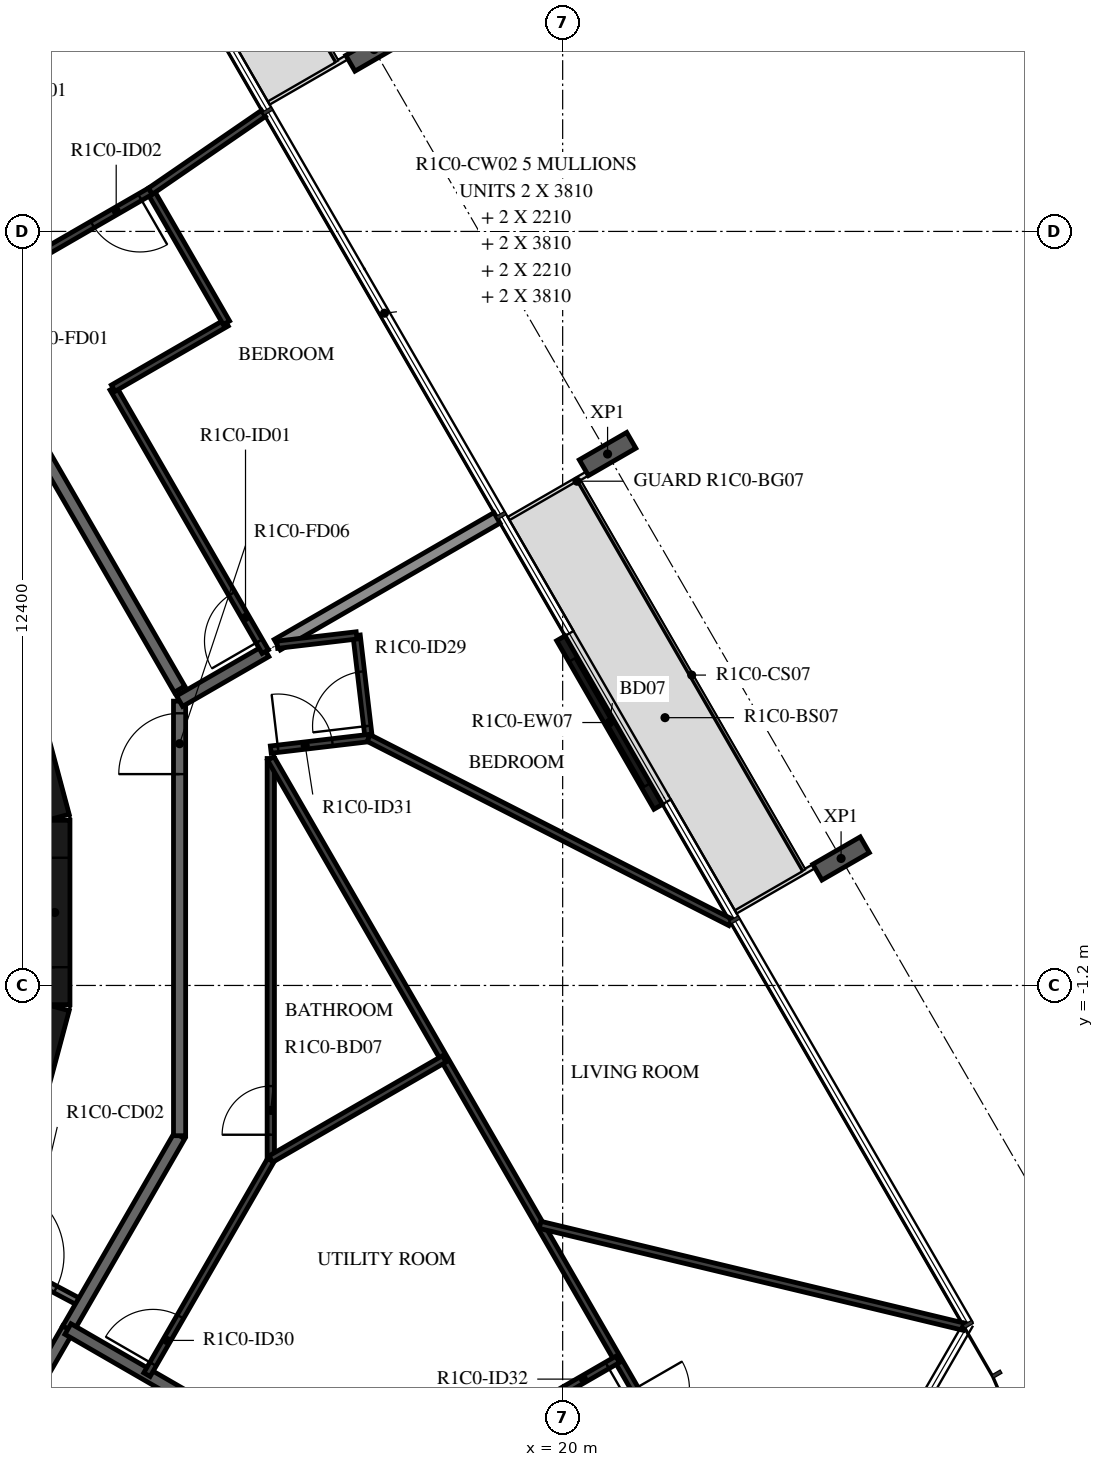
"""IFC4 building model, lengths in metres.
Left out: names, types, materials, properties, quantities, classifications, styles, units other than length and angle.
Written with IfcOpenShell. Run it as: python <this file> out.ifc"""

import sys

from ifc_helpers import new_model, si_unit, direction, frame, frame_2d, origin, origin_2d, place, context, subcontext, project, spatial, rectangle, i_section, extrude, element, fill, save


model = new_model("IFC4")
c1 = context("Model", 3, precision=1e-05, world=origin(), true_north=direction((0.0, 1.0)))
c2 = subcontext(c1, "Body", "Model", "MODEL_VIEW")
j1 = project(units=[si_unit("LENGTHUNIT", "METRE"), si_unit("PLANEANGLEUNIT", "RADIAN")], contexts=[c1])
p1 = place(None, origin())
s1 = spatial("IfcSite", under=j1, at=p1, CompositionType="ELEMENT")
p2 = place(p1, origin())
s2 = spatial("IfcBuilding", under=s1, at=p2, CompositionType="ELEMENT")
p3 = place(p2, frame((0.0, 0.0, 59.4)))
s3 = spatial("IfcBuildingStorey", under=s2, at=p3, CompositionType="ELEMENT", Elevation=59.4)
for number, where, z_axis, x_axis in (
    (1, (24.579, 0.888, -0.38), (0.0, 0.0, 1.0), (0.5, -0.866, 0.0)),
    (2, (20.739, 7.539, -0.38), (0.0, 0.0, 1.0), (0.5, -0.866, 0.0)),
    (3, (16.899, 14.19, -0.38), (0.0, 0.0, 1.0), (0.5, -0.866, 0.0)),
):
    element("IfcColumn", number, at=place(p3, frame(where, z_axis=z_axis, x_axis=x_axis)), inside=s3, PredefinedType="COLUMN", context=c2, shape_type="SweptSolid", body=[
        extrude(i_section(OverallWidth=0.3, OverallDepth=0.9, WebThickness=0.019, FlangeThickness=0.035, FilletRadius=0.03, at=origin_2d()), origin(), (0.0, 0.0, 1.0), 3.5),
    ])
p4 = place(p3, frame((21.571, 1.738, 0.0), z_axis=(0.0, 0.0, 1.0), x_axis=(-0.500028443584, 0.866008981251, 0.0)))
e4 = element("IfcWall", 4, at=p4, inside=s3, PredefinedType="STANDARD", context=c2, shape_type="SweptSolid", body=[
    extrude(rectangle(XDim=3.2, YDim=0.16, at=frame_2d((1.6, 0.0))), origin(), (0.0, 0.0, 1.0), 3.12),
])
p5 = place(p4, frame((0.4, 0.0, 0.0)))
e5 = element("IfcOpeningElement", 5, at=p5, cuts=e4, PredefinedType="OPENING", context=c2, shape_type="SweptSolid", body=[
    extrude(rectangle(XDim=2.4, YDim=2.4, at=frame_2d((1.2, 1.2))), frame((0.0, 0.09, 0.0), z_axis=(0.0, -1.0, 0.0), x_axis=(1.0, 0.0, 0.0)), (0.0, 0.0, 1.0), 0.18),
])
p6 = place(p3, frame((10.858, -4.479, 0.0), z_axis=(0.0, 0.0, 1.0), x_axis=(0.258734743916, 0.965948410781, 0.0)))
e6 = element("IfcWall", 6, at=p6, inside=s3, PredefinedType="SHEAR", context=c2, shape_type="SweptSolid", body=[
    extrude(rectangle(XDim=3.033, YDim=0.5, at=frame_2d((1.516, 0.0))), origin(), (0.0, 0.0, 1.0), 3.12),
])
p7 = place(p3, frame((11.647, -1.516, 0.0), z_axis=(0.0, 0.0, 1.0), x_axis=(0.0, 1.0, 0.0)))
e7 = element("IfcWall", 7, at=p7, inside=s3, PredefinedType="SHEAR", context=c2, shape_type="SweptSolid", body=[
    extrude(rectangle(XDim=3.033, YDim=0.5, at=frame_2d((1.516, 0.0))), origin(), (0.0, 0.0, 1.0), 3.12),
])
p8 = place(p7, frame((0.616, 0.0, 0.0)))
e8 = element("IfcOpeningElement", 8, at=p8, cuts=e7, PredefinedType="OPENING", context=c2, shape_type="SweptSolid", body=[
    extrude(rectangle(XDim=1.8, YDim=2.1, at=frame_2d((0.9, 1.05))), frame((0.0, 0.26, 0.0), z_axis=(0.0, -1.0, 0.0), x_axis=(1.0, 0.0, 0.0)), (0.0, 0.0, 1.0), 0.52),
])
p9 = place(p3, frame((11.643, 1.55, 0.0), z_axis=(0.0, 0.0, 1.0), x_axis=(-0.258734743916, 0.965948410781, 0.0)))
e9 = element("IfcWall", 9, at=p9, inside=s3, PredefinedType="SHEAR", context=c2, shape_type="SweptSolid", body=[
    extrude(rectangle(XDim=3.033, YDim=0.5, at=frame_2d((1.516, 0.0))), origin(), (0.0, 0.0, 1.0), 3.12),
])
p10 = place(p3, frame((10.511, -5.589, 0.0), z_axis=(0.0, 0.0, 1.0), x_axis=(0.88294043061, -0.469485032769, 0.0)))
e10 = element("IfcWall", 10, at=p10, inside=s3, PredefinedType="PARTITIONING", context=c2, shape_type="SweptSolid", body=[
    extrude(rectangle(XDim=1.804, YDim=0.12, at=frame_2d((0.902, 0.0))), origin(), (0.0, 0.0, 1.0), 3.12),
])
p11 = place(p10, frame((0.1, 0.0, 0.0)))
e11 = element("IfcOpeningElement", 11, at=p11, cuts=e10, PredefinedType="OPENING", context=c2, shape_type="SweptSolid", body=[
    extrude(rectangle(XDim=1.2, YDim=2.1, at=frame_2d((0.6, 1.05))), frame((0.0, 0.07, 0.0), z_axis=(0.0, -1.0, 0.0), x_axis=(1.0, 0.0, 0.0)), (0.0, 0.0, 1.0), 0.14),
])
p12 = place(p3, frame((13.7, 3.671, 0.0), z_axis=(0.0, 0.0, 1.0), x_axis=(-0.500001669485, 0.866024439905, 0.0)))
e12 = element("IfcWall", 12, at=p12, inside=s3, PredefinedType="STANDARD", context=c2, shape_type="SweptSolid", body=[
    extrude(rectangle(XDim=7.342, YDim=0.2, at=frame_2d((3.671, 0.0))), origin(), (0.0, 0.0, 1.0), 3.12),
])
p13 = place(p12, frame((6.142, 0.0, 0.0)))
e13 = element("IfcOpeningElement", 13, at=p13, cuts=e12, PredefinedType="OPENING", context=c2, shape_type="SweptSolid", body=[
    extrude(rectangle(XDim=1.0, YDim=2.1, at=frame_2d((0.5, 1.05))), frame((0.0, 0.11, 0.0), z_axis=(0.0, -1.0, 0.0), x_axis=(1.0, 0.0, 0.0)), (0.0, 0.0, 1.0), 0.22),
])
p14 = place(p3, frame((11.865, -6.85, 0.0), z_axis=(0.0, 0.0, 1.0), x_axis=(0.499987270552, 0.86603275301, 0.0)))
e14 = element("IfcWall", 14, at=p14, inside=s3, PredefinedType="STANDARD", context=c2, shape_type="SweptSolid", body=[
    extrude(rectangle(XDim=3.671, YDim=0.2, at=frame_2d((1.835, 0.0))), origin(), (0.0, 0.0, 1.0), 3.12),
])
p15 = place(p3, frame((13.7, -3.671, 0.0), z_axis=(0.0, 0.0, 1.0), x_axis=(0.0, 1.0, 0.0)))
e15 = element("IfcWall", 15, at=p15, inside=s3, PredefinedType="STANDARD", context=c2, shape_type="SweptSolid", body=[
    extrude(rectangle(XDim=7.146, YDim=0.2, at=frame_2d((3.573, 0.0))), origin(), (0.0, 0.0, 1.0), 3.12),
])
p16 = place(p15, frame((5.947, 0.0, 0.0)))
e16 = element("IfcOpeningElement", 16, at=p16, cuts=e15, PredefinedType="OPENING", context=c2, shape_type="SweptSolid", body=[
    extrude(rectangle(XDim=1.0, YDim=2.1, at=frame_2d((0.5, 1.05))), frame((0.0, 0.11, 0.0), z_axis=(0.0, -1.0, 0.0), x_axis=(1.0, 0.0, 0.0)), (0.0, 0.0, 1.0), 0.22),
])
p17 = place(p3, frame((10.029, -10.029, 0.0), z_axis=(0.0, 0.0, 1.0), x_axis=(0.50001606911, 0.866016126081, 0.0)))
e17 = element("IfcWall", 17, at=p17, inside=s3, PredefinedType="STANDARD", context=c2, shape_type="SweptSolid", body=[
    extrude(rectangle(XDim=3.671, YDim=0.2, at=frame_2d((1.835, 0.0))), origin(), (0.0, 0.0, 1.0), 3.12),
])
p18 = place(p3, frame((13.7, 3.476, 0.0), z_axis=(0.0, 0.0, 1.0), x_axis=(0.866014281772, 0.500019263395, 0.0)))
e18 = element("IfcWall", 18, at=p18, inside=s3, PredefinedType="STANDARD", context=c2, shape_type="SweptSolid", body=[
    extrude(rectangle(XDim=1.638, YDim=0.2, at=frame_2d((0.819, 0.0))), origin(), (0.0, 0.0, 1.0), 3.12),
])
p19 = place(p3, frame((15.306, 4.403, 0.0), z_axis=(0.0, 0.0, 1.0), x_axis=(0.866013143551, 0.500021234745, 0.0)))
e19 = element("IfcWall", 19, at=p19, inside=s3, PredefinedType="STANDARD", context=c2, shape_type="SweptSolid", body=[
    extrude(rectangle(XDim=4.173, YDim=0.2, at=frame_2d((2.086, 0.0))), origin(), (0.0, 0.0, 1.0), 2.73),
])
p20 = place(p3, frame((16.817, -9.709, 0.0), z_axis=(0.0, 0.0, 1.0), x_axis=(-0.86604338933, 0.499968846828, 0.0)))
e20 = element("IfcWall", 20, at=p20, inside=s3, PredefinedType="STANDARD", context=c2, shape_type="SweptSolid", body=[
    extrude(rectangle(XDim=5.718, YDim=0.2, at=frame_2d((2.859, 0.0))), origin(), (0.0, 0.0, 1.0), 3.12),
])
p21 = place(p3, frame((15.11, 4.289, 0.0), z_axis=(0.0, 0.0, 1.0), x_axis=(-0.500033654285, 0.866005972602, 0.0)))
e21 = element("IfcWall", 21, at=p21, inside=s3, PredefinedType="PARTITIONING", context=c2, shape_type="SweptSolid", body=[
    extrude(rectangle(XDim=5.003, YDim=0.12, at=frame_2d((2.501, 0.0))), origin(), (0.0, 0.0, 1.0), 3.12),
])
p22 = place(p21, frame((0.2, 0.0, 0.0)))
e22 = element("IfcOpeningElement", 22, at=p22, cuts=e21, PredefinedType="OPENING", context=c2, shape_type="SweptSolid", body=[
    extrude(rectangle(XDim=0.9, YDim=2.1, at=frame_2d((0.45, 1.05))), frame((0.0, 0.07, 0.0), z_axis=(0.0, -1.0, 0.0), x_axis=(1.0, 0.0, 0.0)), (0.0, 0.0, 1.0), 0.14),
])
p23 = place(p3, frame((12.608, 8.622, 0.0), z_axis=(0.0, 0.0, 1.0), x_axis=(0.866005997533, 0.500033611107, 0.0)))
e23 = element("IfcWall", 23, at=p23, inside=s3, PredefinedType="PARTITIONING", context=c2, shape_type="SweptSolid", body=[
    extrude(rectangle(XDim=2.151, YDim=0.12, at=frame_2d((1.075, 0.0))), origin(), (0.0, 0.0, 1.0), 3.12),
])
p24 = place(p3, frame((14.471, 9.697, 0.0), z_axis=(0.0, 0.0, 1.0), x_axis=(-0.500004234368, 0.866022959057, 0.0)))
e24 = element("IfcWall", 24, at=p24, inside=s3, PredefinedType="PARTITIONING", context=c2, shape_type="SweptSolid", body=[
    extrude(rectangle(XDim=2.5, YDim=0.12, at=frame_2d((1.25, 0.0))), origin(), (0.0, 0.0, 1.0), 3.12),
])
p25 = place(p3, frame((13.221, 11.862, 0.0), z_axis=(0.0, 0.0, 1.0), x_axis=(-0.866055151781, -0.499948471418, 0.0)))
e25 = element("IfcWall", 25, at=p25, inside=s3, PredefinedType="PARTITIONING", context=c2, shape_type="SweptSolid", body=[
    extrude(rectangle(XDim=2.151, YDim=0.12, at=frame_2d((1.075, 0.0))), origin(), (0.0, 0.0, 1.0), 3.12),
])
p26 = place(p25, frame((0.2, 0.0, 0.0)))
e26 = element("IfcOpeningElement", 26, at=p26, cuts=e25, PredefinedType="OPENING", context=c2, shape_type="SweptSolid", body=[
    extrude(rectangle(XDim=0.9, YDim=2.1, at=frame_2d((0.45, 1.05))), frame((0.0, 0.07, 0.0), z_axis=(0.0, -1.0, 0.0), x_axis=(1.0, 0.0, 0.0)), (0.0, 0.0, 1.0), 0.14),
])
p27 = place(p3, frame((15.08, 13.14, 0.0), z_axis=(0.0, 0.0, 1.0), x_axis=(-0.824041924199, -0.566528822887, 0.0)))
e27 = element("IfcWall", 27, at=p27, inside=s3, PredefinedType="PARTITIONING", context=c2, shape_type="SweptSolid", body=[
    extrude(rectangle(XDim=2.256, YDim=0.12, at=frame_2d((1.128, 0.0))), origin(), (0.0, 0.0, 1.0), 2.73),
])
p28 = place(p3, frame((16.81, 2.868, 0.0), z_axis=(0.0, 0.0, 1.0), x_axis=(-0.117049566217, 0.993126074096, 0.0)))
e28 = element("IfcWall", 28, at=p28, inside=s3, PredefinedType="PARTITIONING", context=c2, shape_type="SweptSolid", body=[
    extrude(rectangle(XDim=1.7, YDim=0.12, at=frame_2d((0.85, 0.0))), origin(), (0.0, 0.0, 1.0), 3.12),
])
p29 = place(p28, frame((0.2, 0.0, 0.0)))
e29 = element("IfcOpeningElement", 29, at=p29, cuts=e28, PredefinedType="OPENING", context=c2, shape_type="SweptSolid", body=[
    extrude(rectangle(XDim=0.9, YDim=2.1, at=frame_2d((0.45, 1.05))), frame((0.0, 0.07, 0.0), z_axis=(0.0, -1.0, 0.0), x_axis=(1.0, 0.0, 0.0)), (0.0, 0.0, 1.0), 0.14),
])
p30 = place(p3, frame((16.611, 4.556, 0.0), z_axis=(0.0, 0.0, 1.0), x_axis=(-0.993151872114, -0.116830470836, 0.0)))
e30 = element("IfcWall", 30, at=p30, inside=s3, PredefinedType="PARTITIONING", context=c2, shape_type="SweptSolid", body=[
    extrude(rectangle(XDim=1.314, YDim=0.12, at=frame_2d((0.657, 0.0))), origin(), (0.0, 0.0, 1.0), 3.12),
])
p31 = place(p3, frame((13.164, -7.6, 0.0), z_axis=(0.0, 0.0, 1.0), x_axis=(0.499974973053, 0.866039852617, 0.0)))
e31 = element("IfcWall", 31, at=p31, inside=s3, PredefinedType="PARTITIONING", context=c2, shape_type="SweptSolid", body=[
    extrude(rectangle(XDim=4.073, YDim=0.12, at=frame_2d((2.037, 0.0))), origin(), (0.0, 0.0, 1.0), 3.12),
])
p32 = place(p31, frame((0.2, 0.0, 0.0)))
e32 = element("IfcOpeningElement", 32, at=p32, cuts=e31, PredefinedType="OPENING", context=c2, shape_type="SweptSolid", body=[
    extrude(rectangle(XDim=0.9, YDim=2.1, at=frame_2d((0.45, 1.05))), frame((0.0, 0.07, 0.0), z_axis=(0.0, -1.0, 0.0), x_axis=(1.0, 0.0, 0.0)), (0.0, 0.0, 1.0), 0.14),
])
p33 = place(p3, frame((15.2, 2.679, 0.0), z_axis=(0.0, 0.0, 1.0), x_axis=(0.993150604323, 0.116841247567, 0.0)))
e33 = element("IfcWall", 33, at=p33, inside=s3, PredefinedType="PARTITIONING", context=c2, shape_type="SweptSolid", body=[
    extrude(rectangle(XDim=1.621, YDim=0.12, at=frame_2d((0.811, 0.0))), origin(), (0.0, 0.0, 1.0), 3.12),
])
p34 = place(p33, frame((0.12, 0.0, 0.0)))
e34 = element("IfcOpeningElement", 34, at=p34, cuts=e33, PredefinedType="OPENING", context=c2, shape_type="SweptSolid", body=[
    extrude(rectangle(XDim=0.9, YDim=2.1, at=frame_2d((0.45, 1.05))), frame((0.0, 0.07, 0.0), z_axis=(0.0, -1.0, 0.0), x_axis=(1.0, 0.0, 0.0)), (0.0, 0.0, 1.0), 0.14),
])
p35 = place(p3, frame((15.2, -4.055, 0.0), z_axis=(0.0, 0.0, 1.0), x_axis=(0.0, 1.0, 0.0)))
e35 = element("IfcWall", 35, at=p35, inside=s3, PredefinedType="PARTITIONING", context=c2, shape_type="SweptSolid", body=[
    extrude(rectangle(XDim=6.588, YDim=0.12, at=frame_2d((3.294, 0.0))), origin(), (0.0, 0.0, 1.0), 3.12),
])
p36 = place(p35, frame((0.4, 0.0, 0.0)))
e36 = element("IfcOpeningElement", 36, at=p36, cuts=e35, PredefinedType="OPENING", context=c2, shape_type="SweptSolid", body=[
    extrude(rectangle(XDim=0.8, YDim=2.1, at=frame_2d((0.4, 1.05))), frame((0.0, 0.07, 0.0), z_axis=(0.0, -1.0, 0.0), x_axis=(1.0, 0.0, 0.0)), (0.0, 0.0, 1.0), 0.14),
])
p37 = place(p3, frame((16.81, 2.868, 0.0), z_axis=(0.0, 0.0, 1.0), x_axis=(0.891097252128, -0.453812392128, 0.0)))
e37 = element("IfcWall", 37, at=p37, inside=s3, PredefinedType="PARTITIONING", context=c2, shape_type="SweptSolid", body=[
    extrude(rectangle(XDim=6.677, YDim=0.12, at=frame_2d((3.338, 0.0))), origin(), (0.0, 0.0, 1.0), 3.12),
])
p38 = place(p3, frame((15.2, 2.533, 0.0), z_axis=(0.0, 0.0, 1.0), x_axis=(0.500001127339, -0.866024752914, 0.0)))
e38 = element("IfcWall", 38, at=p38, inside=s3, PredefinedType="PARTITIONING", context=c2, shape_type="SweptSolid", body=[
    extrude(rectangle(XDim=14.434, YDim=0.12, at=frame_2d((7.217, 0.0))), origin(), (0.0, 0.0, 1.0), 3.12),
])
p39 = place(p38, frame((11.97, 0.0, 0.0)))
e39 = element("IfcOpeningElement", 39, at=p39, cuts=e38, PredefinedType="OPENING", context=c2, shape_type="SweptSolid", body=[
    extrude(rectangle(XDim=0.9, YDim=2.1, at=frame_2d((0.45, 1.05))), frame((0.0, 0.07, 0.0), z_axis=(0.0, -1.0, 0.0), x_axis=(1.0, 0.0, 0.0)), (0.0, 0.0, 1.0), 0.14),
])
p40 = place(p3, frame((20.905, -7.349, 0.0), z_axis=(0.0, 0.0, 1.0), x_axis=(-0.866032292145, -0.49998806882, 0.0)))
e40 = element("IfcWall", 40, at=p40, inside=s3, PredefinedType="PARTITIONING", context=c2, shape_type="SweptSolid", body=[
    extrude(rectangle(XDim=4.721, YDim=0.12, at=frame_2d((2.36, 0.0))), origin(), (0.0, 0.0, 1.0), 3.12),
])
p41 = place(p40, frame((0.2, 0.0, 0.0)))
e41 = element("IfcOpeningElement", 41, at=p41, cuts=e40, PredefinedType="OPENING", context=c2, shape_type="SweptSolid", body=[
    extrude(rectangle(XDim=0.9, YDim=2.1, at=frame_2d((0.45, 1.05))), frame((0.0, 0.07, 0.0), z_axis=(0.0, -1.0, 0.0), x_axis=(1.0, 0.0, 0.0)), (0.0, 0.0, 1.0), 0.14),
])
p42 = place(p3, frame((18.052, -2.408, 0.0), z_axis=(0.0, 0.0, 1.0), x_axis=(-0.866017718408, -0.500013311227, 0.0)))
e42 = element("IfcWall", 42, at=p42, inside=s3, PredefinedType="PARTITIONING", context=c2, shape_type="SweptSolid", body=[
    extrude(rectangle(XDim=3.294, YDim=0.12, at=frame_2d((1.647, 0.0))), origin(), (0.0, 0.0, 1.0), 3.12),
])
p43 = place(p3, frame((26.6, -6.813, 0.0), z_axis=(0.0, 0.0, 1.0), x_axis=(-0.972307508101, 0.23370517686, 0.0)))
e43 = element("IfcWall", 43, at=p43, inside=s3, PredefinedType="PARTITIONING", context=c2, shape_type="SweptSolid", body=[
    extrude(rectangle(XDim=7.17, YDim=0.12, at=frame_2d((3.585, 0.0))), origin(), (0.0, 0.0, 1.0), 3.12),
])
p44 = place(p5, origin())
e44 = element("IfcDoor", 44, at=p44, inside=s3, OperationType="DOUBLE_DOOR_SLIDING", PredefinedType="DOOR", context=c2, shape_type="SweptSolid", body=[
    extrude(rectangle(XDim=2.4, YDim=2.4, at=frame_2d((1.2, 1.2))), frame((0.0, 0.025, 0.0), z_axis=(0.0, -1.0, 0.0), x_axis=(1.0, 0.0, 0.0)), (0.0, 0.0, 1.0), 0.05),
])
fill(e5, e44)
p45 = place(p8, origin())
e45 = element("IfcDoor", 45, at=p45, inside=s3, OperationType="DOUBLE_DOOR_SINGLE_SWING", PredefinedType="DOOR", context=c2, shape_type="SweptSolid", body=[
    extrude(rectangle(XDim=1.8, YDim=2.1, at=frame_2d((0.9, 1.05))), frame((0.0, 0.025, 0.0), z_axis=(0.0, -1.0, 0.0), x_axis=(1.0, 0.0, 0.0)), (0.0, 0.0, 1.0), 0.05),
])
fill(e8, e45)
p46 = place(p22, origin())
e46 = element("IfcDoor", 46, at=p46, inside=s3, OperationType="SINGLE_SWING_LEFT", PredefinedType="DOOR", context=c2, shape_type="SweptSolid", body=[
    extrude(rectangle(XDim=0.9, YDim=2.1, at=frame_2d((0.45, 1.05))), frame((0.0, 0.025, 0.0), z_axis=(0.0, -1.0, 0.0), x_axis=(1.0, 0.0, 0.0)), (0.0, 0.0, 1.0), 0.05),
])
fill(e22, e46)
p47 = place(p26, origin())
e47 = element("IfcDoor", 47, at=p47, inside=s3, OperationType="SINGLE_SWING_RIGHT", PredefinedType="DOOR", context=c2, shape_type="SweptSolid", body=[
    extrude(rectangle(XDim=0.9, YDim=2.1, at=frame_2d((0.45, 1.05))), frame((0.0, 0.025, 0.0), z_axis=(0.0, -1.0, 0.0), x_axis=(1.0, 0.0, 0.0)), (0.0, 0.0, 1.0), 0.05),
])
fill(e26, e47)
p48 = place(p16, origin())
e48 = element("IfcDoor", 48, at=p48, inside=s3, OperationType="SINGLE_SWING_LEFT", PredefinedType="DOOR", context=c2, shape_type="SweptSolid", body=[
    extrude(rectangle(XDim=1.0, YDim=2.1, at=frame_2d((0.5, 1.05))), frame((0.0, 0.025, 0.0), z_axis=(0.0, -1.0, 0.0), x_axis=(1.0, 0.0, 0.0)), (0.0, 0.0, 1.0), 0.05),
])
fill(e16, e48)
p49 = place(p29, origin())
e49 = element("IfcDoor", 49, at=p49, inside=s3, OperationType="SINGLE_SWING_LEFT", PredefinedType="DOOR", context=c2, shape_type="SweptSolid", body=[
    extrude(rectangle(XDim=0.9, YDim=2.1, at=frame_2d((0.45, 1.05))), frame((0.0, 0.025, 0.0), z_axis=(0.0, -1.0, 0.0), x_axis=(1.0, 0.0, 0.0)), (0.0, 0.0, 1.0), 0.05),
])
fill(e29, e49)
p50 = place(p32, origin())
e50 = element("IfcDoor", 50, at=p50, inside=s3, OperationType="SINGLE_SWING_LEFT", PredefinedType="DOOR", context=c2, shape_type="SweptSolid", body=[
    extrude(rectangle(XDim=0.9, YDim=2.1, at=frame_2d((0.45, 1.05))), frame((0.0, 0.025, 0.0), z_axis=(0.0, -1.0, 0.0), x_axis=(1.0, 0.0, 0.0)), (0.0, 0.0, 1.0), 0.05),
])
fill(e32, e50)
p51 = place(p34, origin())
e51 = element("IfcDoor", 51, at=p51, inside=s3, OperationType="SINGLE_SWING_RIGHT", PredefinedType="DOOR", context=c2, shape_type="SweptSolid", body=[
    extrude(rectangle(XDim=0.9, YDim=2.1, at=frame_2d((0.45, 1.05))), frame((0.0, 0.025, 0.0), z_axis=(0.0, -1.0, 0.0), x_axis=(1.0, 0.0, 0.0)), (0.0, 0.0, 1.0), 0.05),
])
fill(e34, e51)
p52 = place(p36, origin())
e52 = element("IfcDoor", 52, at=p52, inside=s3, OperationType="SINGLE_SWING_LEFT", PredefinedType="DOOR", context=c2, shape_type="SweptSolid", body=[
    extrude(rectangle(XDim=0.8, YDim=2.1, at=frame_2d((0.4, 1.05))), frame((0.0, 0.025, 0.0), z_axis=(0.0, -1.0, 0.0), x_axis=(1.0, 0.0, 0.0)), (0.0, 0.0, 1.0), 0.05),
])
fill(e36, e52)
p53 = place(p41, origin())
e53 = element("IfcDoor", 53, at=p53, inside=s3, OperationType="SINGLE_SWING_LEFT", PredefinedType="DOOR", context=c2, shape_type="SweptSolid", body=[
    extrude(rectangle(XDim=0.9, YDim=2.1, at=frame_2d((0.45, 1.05))), frame((0.0, 0.025, 0.0), z_axis=(0.0, -1.0, 0.0), x_axis=(1.0, 0.0, 0.0)), (0.0, 0.0, 1.0), 0.05),
])
fill(e41, e53)
p54 = place(p11, origin())
e54 = element("IfcDoor", 54, at=p54, inside=s3, OperationType="DOUBLE_DOOR_SINGLE_SWING", PredefinedType="DOOR", context=c2, shape_type="SweptSolid", body=[
    extrude(rectangle(XDim=1.2, YDim=2.1, at=frame_2d((0.6, 1.05))), frame((0.0, 0.025, 0.0), z_axis=(0.0, -1.0, 0.0), x_axis=(1.0, 0.0, 0.0)), (0.0, 0.0, 1.0), 0.05),
])
fill(e11, e54)
save(model, sys.argv[1])
